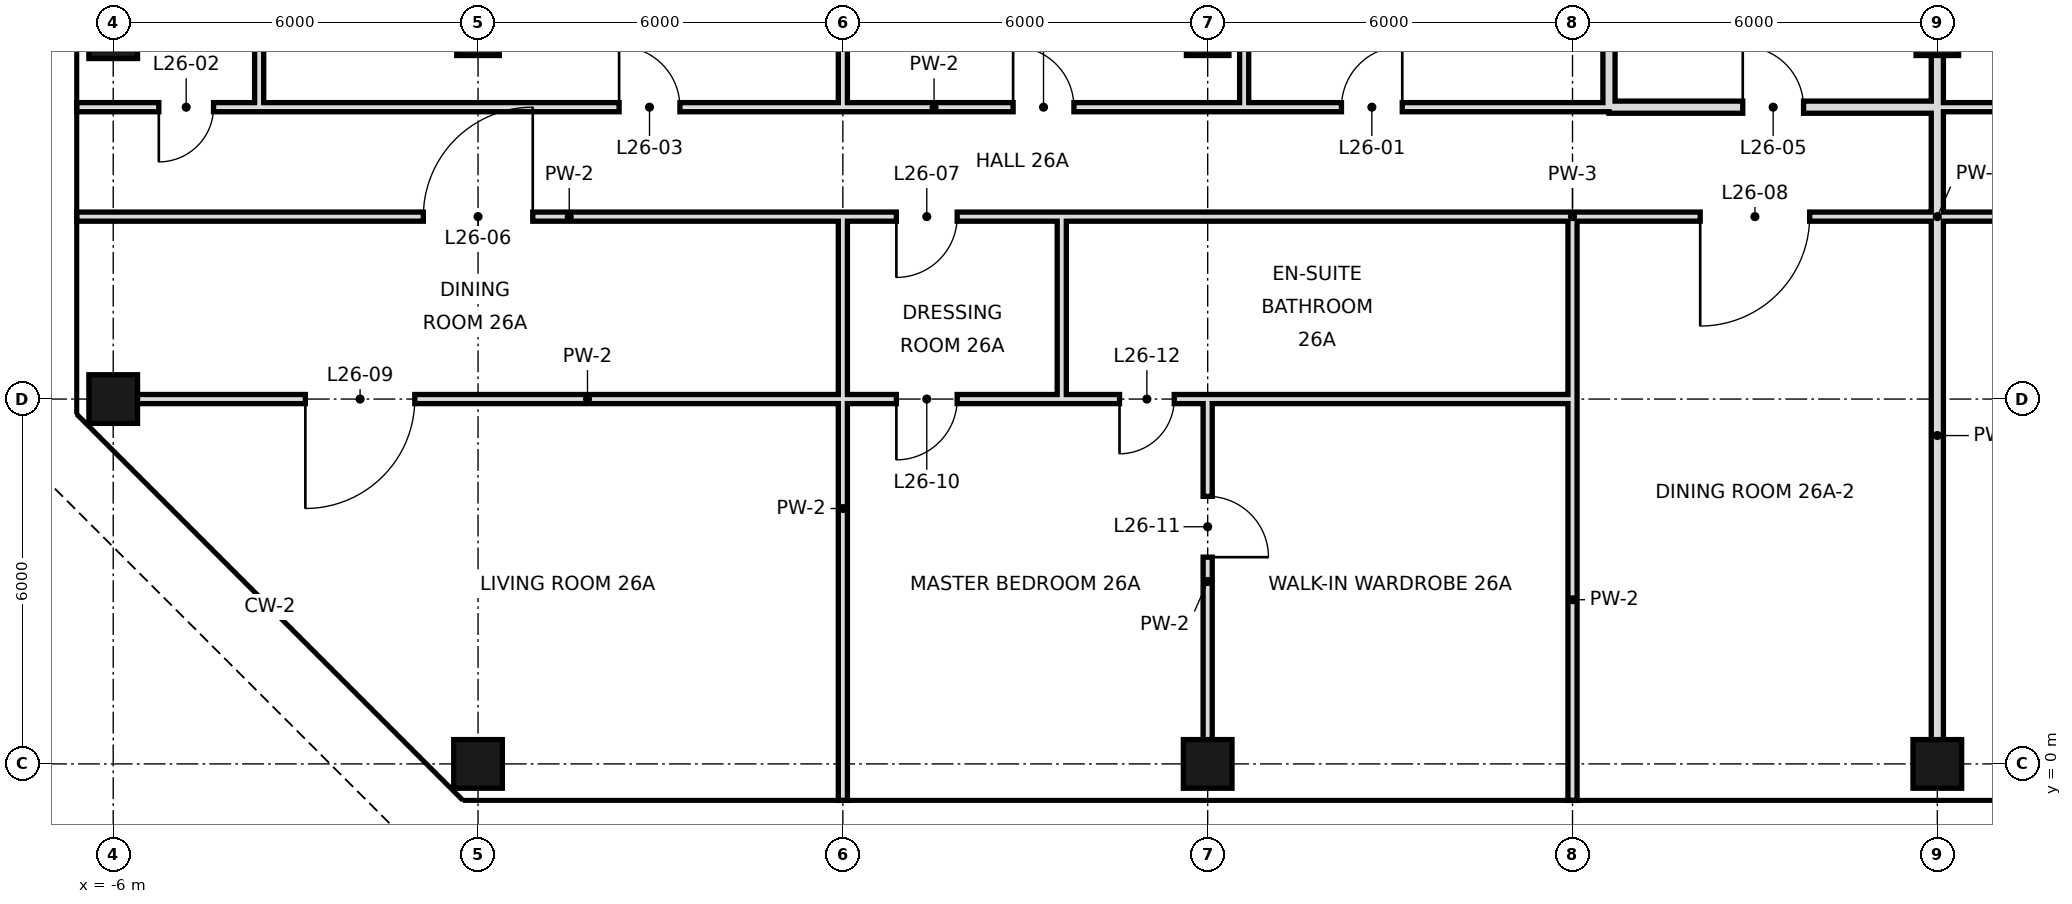
"""IFC4 building model, lengths in metres.
Left out: names, types, materials, properties, quantities, classifications, styles, units other than length and angle.
Written with IfcOpenShell. Run it as: python <this file> out.ifc"""

import sys

from ifc_helpers import new_model, si_unit, direction, frame, frame_2d, origin, origin_2d, place, context, subcontext, project, spatial, rectangle, hollow_rectangle, extrude, element, fill, save


model = new_model("IFC4")
c1 = context("Model", 3, precision=1e-05, world=origin(), true_north=direction((0.0, 1.0)))
c2 = subcontext(c1, "Body", "Model", "MODEL_VIEW")
j1 = project(units=[si_unit("LENGTHUNIT", "METRE"), si_unit("PLANEANGLEUNIT", "RADIAN")], contexts=[c1])
p1 = place(None, origin())
s1 = spatial("IfcSite", under=j1, at=p1, CompositionType="ELEMENT")
p2 = place(p1, origin())
s2 = spatial("IfcBuilding", under=s1, at=p2, CompositionType="ELEMENT")
p3 = place(p2, frame((0.0, 0.0, 119.6)))
s3 = spatial("IfcBuildingStorey", under=s2, at=p3, CompositionType="ELEMENT", Elevation=119.6)
for number, where, z_axis, x_axis in (
    (1, (-6.0, 6.0, 0.0), (0.0, 0.0, 1.0), (1.0, 0.0, 0.0)),
    (2, (-6.0, 12.0, 0.0), (0.0, 0.0, 1.0), (1.0, 0.0, 0.0)),
    (3, (0.0, 0.0, 0.0), (0.0, 0.0, 1.0), (1.0, 0.0, 0.0)),
):
    element("IfcColumn", number, at=place(p3, frame(where, z_axis=z_axis, x_axis=x_axis)), inside=s3, PredefinedType="COLUMN", context=c2, shape_type="SweptSolid", body=[
        extrude(hollow_rectangle(XDim=0.8, YDim=0.8, WallThickness=0.04, at=origin_2d()), origin(), (0.0, 0.0, 1.0), 3.6),
    ])
p4 = place(p3, frame((0.0, 12.0, 0.0), z_axis=(0.0, 0.0, 1.0), x_axis=(1.0, 0.0, 0.0)))
e4 = element("IfcColumn", 4, at=p4, inside=s3, PredefinedType="COLUMN", context=c2, shape_type="SweptSolid", body=[
    extrude(hollow_rectangle(XDim=0.7, YDim=0.7, WallThickness=0.036, at=origin_2d()), origin(), (0.0, 0.0, 1.0), 3.6),
])
p5 = place(p3, frame((12.0, 0.0, 0.0), z_axis=(0.0, 0.0, 1.0), x_axis=(1.0, 0.0, 0.0)))
e5 = element("IfcColumn", 5, at=p5, inside=s3, PredefinedType="COLUMN", context=c2, shape_type="SweptSolid", body=[
    extrude(hollow_rectangle(XDim=0.8, YDim=0.8, WallThickness=0.04, at=origin_2d()), origin(), (0.0, 0.0, 1.0), 3.6),
])
p6 = place(p3, frame((12.0, 12.0, 0.0), z_axis=(0.0, 0.0, 1.0), x_axis=(1.0, 0.0, 0.0)))
e6 = element("IfcColumn", 6, at=p6, inside=s3, PredefinedType="COLUMN", context=c2, shape_type="SweptSolid", body=[
    extrude(hollow_rectangle(XDim=0.7, YDim=0.7, WallThickness=0.036, at=origin_2d()), origin(), (0.0, 0.0, 1.0), 3.6),
])
p7 = place(p3, frame((24.0, 0.0, 0.0), z_axis=(0.0, 0.0, 1.0), x_axis=(1.0, 0.0, 0.0)))
e7 = element("IfcColumn", 7, at=p7, inside=s3, PredefinedType="COLUMN", context=c2, shape_type="SweptSolid", body=[
    extrude(hollow_rectangle(XDim=0.8, YDim=0.8, WallThickness=0.04, at=origin_2d()), origin(), (0.0, 0.0, 1.0), 3.6),
])
p8 = place(p3, frame((24.0, 12.0, 0.0), z_axis=(0.0, 0.0, 1.0), x_axis=(1.0, 0.0, 0.0)))
e8 = element("IfcColumn", 8, at=p8, inside=s3, PredefinedType="COLUMN", context=c2, shape_type="SweptSolid", body=[
    extrude(hollow_rectangle(XDim=0.7, YDim=0.7, WallThickness=0.036, at=origin_2d()), origin(), (0.0, 0.0, 1.0), 3.6),
])
p9 = place(p3, frame((-3.6, 10.8, 0.0), z_axis=(0.0, 0.0, 1.0), x_axis=(0.0, 1.0, 0.0)))
e9 = element("IfcWall", 9, at=p9, inside=s3, PredefinedType="PARTITIONING", context=c2, shape_type="SweptSolid", body=[
    extrude(rectangle(XDim=7.2, YDim=0.15, at=frame_2d((3.6, 0.0))), origin(), (0.0, 0.0, 1.0), 3.42),
])
p10 = place(p3, frame((12.0, 0.0, 0.0), z_axis=(0.0, 0.0, 1.0), x_axis=(0.0, 1.0, 0.0)))
e10 = element("IfcWall", 10, at=p10, inside=s3, PredefinedType="PARTITIONING", context=c2, shape_type="SweptSolid", body=[
    extrude(rectangle(XDim=6.0, YDim=0.15, at=frame_2d((3.0, 0.0))), origin(), (0.0, 0.0, 1.0), 2.72),
])
p11 = place(p10, frame((3.4, 0.0, 0.0)))
e11 = element("IfcOpeningElement", 11, at=p11, cuts=e10, PredefinedType="OPENING", context=c2, shape_type="SweptSolid", body=[
    extrude(rectangle(XDim=1.0, YDim=2.4, at=frame_2d((0.5, 1.2))), frame((0.0, 0.085, 0.0), z_axis=(0.0, -1.0, 0.0), x_axis=(1.0, 0.0, 0.0)), (0.0, 0.0, 1.0), 0.17),
])
p12 = place(p3, frame((12.6, 10.8, 0.0), z_axis=(0.0, 0.0, 1.0), x_axis=(0.0, 1.0, 0.0)))
e12 = element("IfcWall", 12, at=p12, inside=s3, PredefinedType="PARTITIONING", context=c2, shape_type="SweptSolid", body=[
    extrude(rectangle(XDim=7.9, YDim=0.15, at=frame_2d((3.95, 0.0))), origin(), (0.0, 0.0, 1.0), 3.42),
])
p13 = place(p3, frame((18.0, -0.6, 0.0), z_axis=(0.0, 0.0, 1.0), x_axis=(0.0, 1.0, 0.0)))
e13 = element("IfcWall", 13, at=p13, inside=s3, PredefinedType="PARTITIONING", context=c2, shape_type="SweptSolid", body=[
    extrude(rectangle(XDim=6.6, YDim=0.15, at=frame_2d((3.3, 0.0))), origin(), (0.0, 0.0, 1.0), 2.72),
])
p14 = place(p3, frame((18.0, 6.0, 0.0), z_axis=(0.0, 0.0, 1.0), x_axis=(0.0, 1.0, 0.0)))
e14 = element("IfcWall", 14, at=p14, inside=s3, PredefinedType="PARTITIONING", context=c2, shape_type="SweptSolid", body=[
    extrude(rectangle(XDim=3.0, YDim=0.15, at=frame_2d((1.5, 0.0))), origin(), (0.0, 0.0, 1.0), 2.72),
])
for number, where, z_axis, x_axis in (
    (15, (18.6, 10.8, 0.0), (0.0, 0.0, 1.0), (0.0, 1.0, 0.0)),
    (16, (24.0, 10.8, 0.0), (0.0, 0.0, 1.0), (0.0, 1.0, 0.0)),
):
    element("IfcWall", number, at=place(p3, frame(where, z_axis=z_axis, x_axis=x_axis)), inside=s3, PredefinedType="SOLIDWALL", context=c2, shape_type="SweptSolid", body=[
        extrude(rectangle(XDim=7.9, YDim=0.2, at=frame_2d((3.95, 0.0))), origin(), (0.0, 0.0, 1.0), 2.72),
    ])
p15 = place(p3, frame((24.0, 0.0, 0.0), z_axis=(0.0, 0.0, 1.0), x_axis=(0.0, 1.0, 0.0)))
e17 = element("IfcWall", 17, at=p15, inside=s3, PredefinedType="SOLIDWALL", context=c2, shape_type="SweptSolid", body=[
    extrude(rectangle(XDim=10.8, YDim=0.2, at=frame_2d((5.4, 0.0))), origin(), (0.0, 0.0, 1.0), 2.72),
])
p16 = place(p3, frame((6.0, -0.6, 0.0), z_axis=(0.0, 0.0, 1.0), x_axis=(0.0, 1.0, 0.0)))
e18 = element("IfcWall", 18, at=p16, inside=s3, PredefinedType="PARTITIONING", context=c2, shape_type="SweptSolid", body=[
    extrude(rectangle(XDim=9.6, YDim=0.15, at=frame_2d((4.8, 0.0))), origin(), (0.0, 0.0, 1.0), 2.72),
])
p17 = place(p3, frame((6.0, 10.8, 0.0), z_axis=(0.0, 0.0, 1.0), x_axis=(0.0, 1.0, 0.0)))
e19 = element("IfcWall", 19, at=p17, inside=s3, PredefinedType="PARTITIONING", context=c2, shape_type="SweptSolid", body=[
    extrude(rectangle(XDim=7.9, YDim=0.15, at=frame_2d((3.95, 0.0))), origin(), (0.0, 0.0, 1.0), 2.72),
])
p18 = place(p3, frame((9.6, 6.0, 0.0), z_axis=(0.0, 0.0, 1.0), x_axis=(0.0, 1.0, 0.0)))
e20 = element("IfcWall", 20, at=p18, inside=s3, PredefinedType="PARTITIONING", context=c2, shape_type="SweptSolid", body=[
    extrude(rectangle(XDim=3.0, YDim=0.15, at=frame_2d((1.5, 0.0))), origin(), (0.0, 0.0, 1.0), 3.42),
])
p19 = place(p3, frame((18.6, 10.8, 0.0), z_axis=(0.0, 0.0, 1.0), x_axis=(1.0, 0.0, 0.0)))
e21 = element("IfcWall", 21, at=p19, inside=s3, PredefinedType="SOLIDWALL", context=c2, shape_type="SweptSolid", body=[
    extrude(rectangle(XDim=5.4, YDim=0.2, at=frame_2d((2.7, 0.0))), origin(), (0.0, 0.0, 1.0), 2.72),
])
p20 = place(p19, frame((2.2, 0.0, 0.0)))
e22 = element("IfcOpeningElement", 22, at=p20, cuts=e21, PredefinedType="OPENING", context=c2, shape_type="SweptSolid", body=[
    extrude(rectangle(XDim=1.0, YDim=2.4, at=frame_2d((0.5, 1.2))), frame((0.0, 0.11, 0.0), z_axis=(0.0, -1.0, 0.0), x_axis=(1.0, 0.0, 0.0)), (0.0, 0.0, 1.0), 0.22),
])
p21 = place(p3, frame((-3.6, 10.8, 0.0), z_axis=(0.0, 0.0, 1.0), x_axis=(1.0, 0.0, 0.0)))
e23 = element("IfcWall", 23, at=p21, inside=s3, PredefinedType="PARTITIONING", context=c2, shape_type="SweptSolid", body=[
    extrude(rectangle(XDim=22.2, YDim=0.15, at=frame_2d((11.1, 0.0))), origin(), (0.0, 0.0, 1.0), 3.42),
])
p22 = place(p21, frame((17.8, 0.0, 0.0)))
e24 = element("IfcOpeningElement", 24, at=p22, cuts=e23, PredefinedType="OPENING", context=c2, shape_type="SweptSolid", body=[
    extrude(rectangle(XDim=1.0, YDim=2.4, at=frame_2d((0.5, 1.2))), frame((0.0, 0.085, 0.0), z_axis=(0.0, -1.0, 0.0), x_axis=(1.0, 0.0, 0.0)), (0.0, 0.0, 1.0), 0.17),
])
p23 = place(p21, frame((5.92, 0.0, 0.0)))
e25 = element("IfcOpeningElement", 25, at=p23, cuts=e23, PredefinedType="OPENING", context=c2, shape_type="SweptSolid", body=[
    extrude(rectangle(XDim=1.0, YDim=2.4, at=frame_2d((0.5, 1.2))), frame((0.0, 0.085, 0.0), z_axis=(0.0, -1.0, 0.0), x_axis=(1.0, 0.0, 0.0)), (0.0, 0.0, 1.0), 0.17),
])
p24 = place(p21, frame((12.4, 0.0, 0.0)))
e26 = element("IfcOpeningElement", 26, at=p24, cuts=e23, PredefinedType="OPENING", context=c2, shape_type="SweptSolid", body=[
    extrude(rectangle(XDim=1.0, YDim=2.4, at=frame_2d((0.5, 1.2))), frame((0.0, 0.085, 0.0), z_axis=(0.0, -1.0, 0.0), x_axis=(1.0, 0.0, 0.0)), (0.0, 0.0, 1.0), 0.17),
])
p25 = place(p3, frame((24.0, 10.8, 0.0), z_axis=(0.0, 0.0, 1.0), x_axis=(1.0, 0.0, 0.0)))
e27 = element("IfcWall", 27, at=p25, inside=s3, PredefinedType="PARTITIONING", context=c2, shape_type="SweptSolid", body=[
    extrude(rectangle(XDim=6.0, YDim=0.15, at=frame_2d((3.0, 0.0))), origin(), (0.0, 0.0, 1.0), 3.42),
])
p26 = place(p25, frame((3.4, 0.0, 0.0)))
e28 = element("IfcOpeningElement", 28, at=p26, cuts=e27, PredefinedType="OPENING", context=c2, shape_type="SweptSolid", body=[
    extrude(rectangle(XDim=1.0, YDim=2.4, at=frame_2d((0.5, 1.2))), frame((0.0, 0.085, 0.0), z_axis=(0.0, -1.0, 0.0), x_axis=(1.0, 0.0, 0.0)), (0.0, 0.0, 1.0), 0.17),
])
p27 = place(p3, frame((-6.6, 10.8, 0.0), z_axis=(0.0, 0.0, 1.0), x_axis=(1.0, 0.0, 0.0)))
e29 = element("IfcWall", 29, at=p27, inside=s3, PredefinedType="PARTITIONING", context=c2, shape_type="SweptSolid", body=[
    extrude(rectangle(XDim=3.0, YDim=0.15, at=frame_2d((1.5, 0.0))), origin(), (0.0, 0.0, 1.0), 3.42),
])
p28 = place(p27, frame((1.35, 0.0, 0.0)))
e30 = element("IfcOpeningElement", 30, at=p28, cuts=e29, PredefinedType="OPENING", context=c2, shape_type="SweptSolid", body=[
    extrude(rectangle(XDim=0.9, YDim=2.4, at=frame_2d((0.45, 1.2))), frame((0.0, 0.085, 0.0), z_axis=(0.0, -1.0, 0.0), x_axis=(1.0, 0.0, 0.0)), (0.0, 0.0, 1.0), 0.17),
])
p29 = place(p3, frame((-6.0, 6.0, 0.0), z_axis=(0.0, 0.0, 1.0), x_axis=(1.0, 0.0, 0.0)))
e31 = element("IfcWall", 31, at=p29, inside=s3, PredefinedType="PARTITIONING", context=c2, shape_type="SweptSolid", body=[
    extrude(rectangle(XDim=15.6, YDim=0.15, at=frame_2d((7.8, 0.0))), origin(), (0.0, 0.0, 1.0), 2.97),
])
p30 = place(p29, frame((3.16, 0.0, 0.0)))
e32 = element("IfcOpeningElement", 32, at=p30, cuts=e31, PredefinedType="OPENING", context=c2, shape_type="SweptSolid", body=[
    extrude(rectangle(XDim=1.8, YDim=2.4, at=frame_2d((0.9, 1.2))), frame((0.0, 0.085, 0.0), z_axis=(0.0, -1.0, 0.0), x_axis=(1.0, 0.0, 0.0)), (0.0, 0.0, 1.0), 0.17),
])
p31 = place(p29, frame((12.88, 0.0, 0.0)))
e33 = element("IfcOpeningElement", 33, at=p31, cuts=e31, PredefinedType="OPENING", context=c2, shape_type="SweptSolid", body=[
    extrude(rectangle(XDim=1.0, YDim=2.4, at=frame_2d((0.5, 1.2))), frame((0.0, 0.085, 0.0), z_axis=(0.0, -1.0, 0.0), x_axis=(1.0, 0.0, 0.0)), (0.0, 0.0, 1.0), 0.17),
])
p32 = place(p3, frame((9.6, 6.0, 0.0), z_axis=(0.0, 0.0, 1.0), x_axis=(1.0, 0.0, 0.0)))
e34 = element("IfcWall", 34, at=p32, inside=s3, PredefinedType="PARTITIONING", context=c2, shape_type="SweptSolid", body=[
    extrude(rectangle(XDim=8.4, YDim=0.15, at=frame_2d((4.2, 0.0))), origin(), (0.0, 0.0, 1.0), 2.97),
])
p33 = place(p32, frame((0.95, 0.0, 0.0)))
e35 = element("IfcOpeningElement", 35, at=p33, cuts=e34, PredefinedType="OPENING", context=c2, shape_type="SweptSolid", body=[
    extrude(rectangle(XDim=0.9, YDim=2.4, at=frame_2d((0.45, 1.2))), frame((0.0, 0.085, 0.0), z_axis=(0.0, -1.0, 0.0), x_axis=(1.0, 0.0, 0.0)), (0.0, 0.0, 1.0), 0.17),
])
p34 = place(p3, frame((-6.6, 9.0, 0.0), z_axis=(0.0, 0.0, 1.0), x_axis=(1.0, 0.0, 0.0)))
e36 = element("IfcWall", 36, at=p34, inside=s3, PredefinedType="PARTITIONING", context=c2, shape_type="SweptSolid", body=[
    extrude(rectangle(XDim=16.2, YDim=0.15, at=frame_2d((8.1, 0.0))), origin(), (0.0, 0.0, 1.0), 3.42),
])
p35 = place(p34, frame((5.7, 0.0, 0.0)))
e37 = element("IfcOpeningElement", 37, at=p35, cuts=e36, PredefinedType="OPENING", context=c2, shape_type="SweptSolid", body=[
    extrude(rectangle(XDim=1.8, YDim=2.4, at=frame_2d((0.9, 1.2))), frame((0.0, 0.085, 0.0), z_axis=(0.0, -1.0, 0.0), x_axis=(1.0, 0.0, 0.0)), (0.0, 0.0, 1.0), 0.17),
])
p36 = place(p34, frame((13.48, 0.0, 0.0)))
e38 = element("IfcOpeningElement", 38, at=p36, cuts=e36, PredefinedType="OPENING", context=c2, shape_type="SweptSolid", body=[
    extrude(rectangle(XDim=1.0, YDim=2.4, at=frame_2d((0.5, 1.2))), frame((0.0, 0.085, 0.0), z_axis=(0.0, -1.0, 0.0), x_axis=(1.0, 0.0, 0.0)), (0.0, 0.0, 1.0), 0.17),
])
p37 = place(p3, frame((18.0, 9.0, 0.0), z_axis=(0.0, 0.0, 1.0), x_axis=(1.0, 0.0, 0.0)))
e39 = element("IfcWall", 39, at=p37, inside=s3, PredefinedType="PARTITIONING", context=c2, shape_type="SweptSolid", body=[
    extrude(rectangle(XDim=12.0, YDim=0.15, at=frame_2d((6.0, 0.0))), origin(), (0.0, 0.0, 1.0), 3.42),
])
p38 = place(p37, frame((2.1, 0.0, 0.0)))
e40 = element("IfcOpeningElement", 40, at=p38, cuts=e39, PredefinedType="OPENING", context=c2, shape_type="SweptSolid", body=[
    extrude(rectangle(XDim=1.8, YDim=2.4, at=frame_2d((0.9, 1.2))), frame((0.0, 0.085, 0.0), z_axis=(0.0, -1.0, 0.0), x_axis=(1.0, 0.0, 0.0)), (0.0, 0.0, 1.0), 0.17),
])
p39 = place(p37, frame((7.6, 0.0, 0.0)))
e41 = element("IfcOpeningElement", 41, at=p39, cuts=e39, PredefinedType="OPENING", context=c2, shape_type="SweptSolid", body=[
    extrude(rectangle(XDim=1.0, YDim=2.4, at=frame_2d((0.5, 1.2))), frame((0.0, 0.085, 0.0), z_axis=(0.0, -1.0, 0.0), x_axis=(1.0, 0.0, 0.0)), (0.0, 0.0, 1.0), 0.17),
])
p40 = place(p3, frame((9.6, 9.0, 0.0), z_axis=(0.0, 0.0, 1.0), x_axis=(1.0, 0.0, 0.0)))
e42 = element("IfcWall", 42, at=p40, inside=s3, PredefinedType="PARTITIONING", context=c2, shape_type="SweptSolid", body=[
    extrude(rectangle(XDim=8.4, YDim=0.15, at=frame_2d((4.2, 0.0))), origin(), (0.0, 0.0, 1.0), 3.42),
])
p41 = place(p22, frame((1.0, 0.0, 0.0), z_axis=(0.0, 0.0, 1.0), x_axis=(-1.0, 0.0, 0.0)))
e43 = element("IfcDoor", 43, at=p41, inside=s3, OperationType="SINGLE_SWING_LEFT", PredefinedType="DOOR", context=c2, shape_type="SweptSolid", body=[
    extrude(rectangle(XDim=1.0, YDim=2.4, at=frame_2d((0.5, 1.2))), frame((0.0, 0.025, 0.0), z_axis=(0.0, -1.0, 0.0), x_axis=(1.0, 0.0, 0.0)), (0.0, 0.0, 1.0), 0.05),
])
fill(e24, e43)
p42 = place(p28, frame((0.9, 0.0, 0.0), z_axis=(0.0, 0.0, 1.0), x_axis=(-1.0, 0.0, 0.0)))
e44 = element("IfcDoor", 44, at=p42, inside=s3, OperationType="SINGLE_SWING_RIGHT", PredefinedType="DOOR", context=c2, shape_type="SweptSolid", body=[
    extrude(rectangle(XDim=0.9, YDim=2.4, at=frame_2d((0.45, 1.2))), frame((0.0, 0.025, 0.0), z_axis=(0.0, -1.0, 0.0), x_axis=(1.0, 0.0, 0.0)), (0.0, 0.0, 1.0), 0.05),
])
fill(e30, e44)
p43 = place(p23, origin())
e45 = element("IfcDoor", 45, at=p43, inside=s3, OperationType="SINGLE_SWING_LEFT", PredefinedType="DOOR", context=c2, shape_type="SweptSolid", body=[
    extrude(rectangle(XDim=1.0, YDim=2.4, at=frame_2d((0.5, 1.2))), frame((0.0, 0.025, 0.0), z_axis=(0.0, -1.0, 0.0), x_axis=(1.0, 0.0, 0.0)), (0.0, 0.0, 1.0), 0.05),
])
fill(e25, e45)
p44 = place(p24, origin())
e46 = element("IfcDoor", 46, at=p44, inside=s3, OperationType="SINGLE_SWING_LEFT", PredefinedType="DOOR", context=c2, shape_type="SweptSolid", body=[
    extrude(rectangle(XDim=1.0, YDim=2.4, at=frame_2d((0.5, 1.2))), frame((0.0, 0.025, 0.0), z_axis=(0.0, -1.0, 0.0), x_axis=(1.0, 0.0, 0.0)), (0.0, 0.0, 1.0), 0.05),
])
fill(e26, e46)
p45 = place(p20, origin())
e47 = element("IfcDoor", 47, at=p45, inside=s3, OperationType="SINGLE_SWING_LEFT", PredefinedType="DOOR", context=c2, shape_type="SweptSolid", body=[
    extrude(rectangle(XDim=1.0, YDim=2.4, at=frame_2d((0.5, 1.2))), frame((0.0, 0.025, 0.0), z_axis=(0.0, -1.0, 0.0), x_axis=(1.0, 0.0, 0.0)), (0.0, 0.0, 1.0), 0.05),
])
fill(e22, e47)
p46 = place(p35, frame((1.8, 0.0, 0.0), z_axis=(0.0, 0.0, 1.0), x_axis=(-1.0, 0.0, 0.0)))
e48 = element("IfcDoor", 48, at=p46, inside=s3, OperationType="SINGLE_SWING_LEFT", PredefinedType="DOOR", context=c2, shape_type="SweptSolid", body=[
    extrude(rectangle(XDim=1.8, YDim=2.4, at=frame_2d((0.9, 1.2))), frame((0.0, 0.025, 0.0), z_axis=(0.0, -1.0, 0.0), x_axis=(1.0, 0.0, 0.0)), (0.0, 0.0, 1.0), 0.05),
])
fill(e37, e48)
p47 = place(p36, frame((1.0, 0.0, 0.0), z_axis=(0.0, 0.0, 1.0), x_axis=(-1.0, 0.0, 0.0)))
e49 = element("IfcDoor", 49, at=p47, inside=s3, OperationType="SINGLE_SWING_RIGHT", PredefinedType="DOOR", context=c2, shape_type="SweptSolid", body=[
    extrude(rectangle(XDim=1.0, YDim=2.4, at=frame_2d((0.5, 1.2))), frame((0.0, 0.025, 0.0), z_axis=(0.0, -1.0, 0.0), x_axis=(1.0, 0.0, 0.0)), (0.0, 0.0, 1.0), 0.05),
])
fill(e38, e49)
p48 = place(p38, frame((1.8, 0.0, 0.0), z_axis=(0.0, 0.0, 1.0), x_axis=(-1.0, 0.0, 0.0)))
e50 = element("IfcDoor", 50, at=p48, inside=s3, OperationType="SINGLE_SWING_RIGHT", PredefinedType="DOOR", context=c2, shape_type="SweptSolid", body=[
    extrude(rectangle(XDim=1.8, YDim=2.4, at=frame_2d((0.9, 1.2))), frame((0.0, 0.025, 0.0), z_axis=(0.0, -1.0, 0.0), x_axis=(1.0, 0.0, 0.0)), (0.0, 0.0, 1.0), 0.05),
])
fill(e40, e50)
p49 = place(p30, frame((1.8, 0.0, 0.0), z_axis=(0.0, 0.0, 1.0), x_axis=(-1.0, 0.0, 0.0)))
e51 = element("IfcDoor", 51, at=p49, inside=s3, OperationType="SINGLE_SWING_RIGHT", PredefinedType="DOOR", context=c2, shape_type="SweptSolid", body=[
    extrude(rectangle(XDim=1.8, YDim=2.4, at=frame_2d((0.9, 1.2))), frame((0.0, 0.025, 0.0), z_axis=(0.0, -1.0, 0.0), x_axis=(1.0, 0.0, 0.0)), (0.0, 0.0, 1.0), 0.05),
])
fill(e32, e51)
p50 = place(p31, frame((1.0, 0.0, 0.0), z_axis=(0.0, 0.0, 1.0), x_axis=(-1.0, 0.0, 0.0)))
e52 = element("IfcDoor", 52, at=p50, inside=s3, OperationType="SINGLE_SWING_RIGHT", PredefinedType="DOOR", context=c2, shape_type="SweptSolid", body=[
    extrude(rectangle(XDim=1.0, YDim=2.4, at=frame_2d((0.5, 1.2))), frame((0.0, 0.025, 0.0), z_axis=(0.0, -1.0, 0.0), x_axis=(1.0, 0.0, 0.0)), (0.0, 0.0, 1.0), 0.05),
])
fill(e33, e52)
p51 = place(p11, frame((1.0, 0.0, 0.0), z_axis=(0.0, 0.0, 1.0), x_axis=(-1.0, 0.0, 0.0)))
e53 = element("IfcDoor", 53, at=p51, inside=s3, OperationType="SINGLE_SWING_RIGHT", PredefinedType="DOOR", context=c2, shape_type="SweptSolid", body=[
    extrude(rectangle(XDim=1.0, YDim=2.4, at=frame_2d((0.5, 1.2))), frame((0.0, 0.025, 0.0), z_axis=(0.0, -1.0, 0.0), x_axis=(1.0, 0.0, 0.0)), (0.0, 0.0, 1.0), 0.05),
])
fill(e11, e53)
p52 = place(p33, frame((0.9, 0.0, 0.0), z_axis=(0.0, 0.0, 1.0), x_axis=(-1.0, 0.0, 0.0)))
e54 = element("IfcDoor", 54, at=p52, inside=s3, OperationType="SINGLE_SWING_RIGHT", PredefinedType="DOOR", context=c2, shape_type="SweptSolid", body=[
    extrude(rectangle(XDim=0.9, YDim=2.4, at=frame_2d((0.45, 1.2))), frame((0.0, 0.025, 0.0), z_axis=(0.0, -1.0, 0.0), x_axis=(1.0, 0.0, 0.0)), (0.0, 0.0, 1.0), 0.05),
])
fill(e35, e54)
save(model, sys.argv[1])
